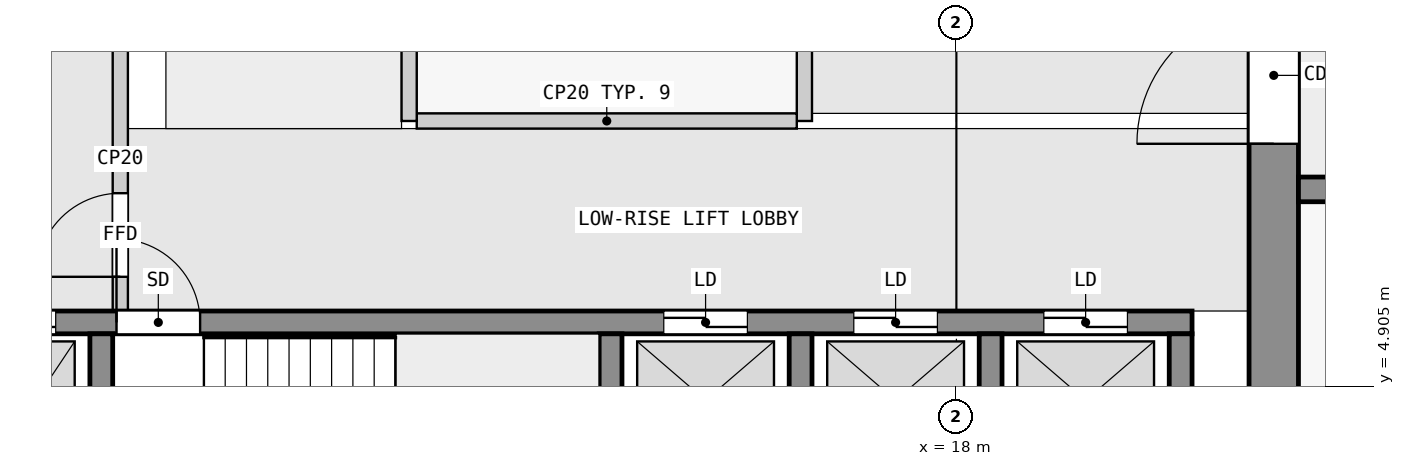
"""IFC4 building model, lengths in metres.
Left out: names, types, materials, properties, quantities, classifications, styles, units other than length and angle.
Written with IfcOpenShell. Run it as: python <this file> out.ifc"""

import sys

from ifc_helpers import new_model, si_unit, direction, frame, frame_2d, origin, place, context, subcontext, project, spatial, rectangle, extrude, element, fill, save


model = new_model("IFC4")
c1 = context("Model", 3, precision=1e-05, world=origin(), true_north=direction((0.0, 1.0)))
c2 = subcontext(c1, "Body", "Model", "MODEL_VIEW")
j1 = project(units=[si_unit("LENGTHUNIT", "METRE"), si_unit("PLANEANGLEUNIT", "RADIAN")], contexts=[c1])
p1 = place(None, origin())
s1 = spatial("IfcSite", under=j1, at=p1, CompositionType="ELEMENT")
p2 = place(p1, origin())
s2 = spatial("IfcBuilding", under=s1, at=p2, CompositionType="ELEMENT")
p3 = place(p2, frame((0.0, 0.0, 116.8)))
s3 = spatial("IfcBuildingStorey", under=s2, at=p3, CompositionType="ELEMENT", Elevation=116.8)
p4 = place(p3, frame((22.175, 2.5, 0.0), z_axis=(0.0, 0.0, 1.0), x_axis=(0.0, 1.0, 0.0)))
e1 = element("IfcWall", 1, at=p4, inside=s3, PredefinedType="SHEAR", context=c2, shape_type="SweptSolid", body=[
    extrude(rectangle(XDim=14.85, YDim=0.65, at=frame_2d((7.425, 0.0))), origin(), (0.0, 0.0, 1.0), 3.25),
])
p5 = place(p4, frame((5.6, 0.0, 0.0)))
e2 = element("IfcOpeningElement", 2, at=p5, cuts=e1, PredefinedType="OPENING", context=c2, shape_type="SweptSolid", body=[
    extrude(rectangle(XDim=1.8, YDim=2.1, at=frame_2d((0.9, 1.05))), frame((0.0, 0.335, 0.0), z_axis=(0.0, -1.0, 0.0), x_axis=(1.0, 0.0, 0.0)), (0.0, 0.0, 1.0), 0.67),
])
for number, where, z_axis, x_axis in (
    (3, (6.75, 2.8, 0.0), (0.0, 0.0, 1.0), (0.0, 1.0, 0.0)),
    (4, (13.45, 2.8, 0.0), (0.0, 0.0, 1.0), (0.0, 1.0, 0.0)),
    (5, (15.95, 2.8, 0.0), (0.0, 0.0, 1.0), (0.0, 1.0, 0.0)),
    (6, (18.45, 2.8, 0.0), (0.0, 0.0, 1.0), (0.0, 1.0, 0.0)),
    (7, (20.95, 2.8, 0.0), (0.0, 0.0, 1.0), (0.0, 1.0, 0.0)),
):
    element("IfcWall", number, at=place(p3, frame(where, z_axis=z_axis, x_axis=x_axis)), inside=s3, PredefinedType="SHEAR", context=c2, shape_type="SweptSolid", body=[
        extrude(rectangle(XDim=2.8, YDim=0.3, at=frame_2d((1.4, 0.0))), origin(), (0.0, 0.0, 1.0), 3.25),
    ])
p6 = place(p3, frame((2.3, 5.75, 0.0), z_axis=(0.0, 0.0, 1.0), x_axis=(1.0, 0.0, 0.0)))
e8 = element("IfcWall", 8, at=p6, inside=s3, PredefinedType="SHEAR", context=c2, shape_type="SweptSolid", body=[
    extrude(rectangle(XDim=18.8, YDim=0.3, at=frame_2d((9.4, 0.0))), origin(), (0.0, 0.0, 1.0), 3.25),
])
p7 = place(p6, frame((4.65, 0.0, 0.0)))
e9 = element("IfcOpeningElement", 9, at=p7, cuts=e8, PredefinedType="OPENING", context=c2, shape_type="SweptSolid", body=[
    extrude(rectangle(XDim=1.1, YDim=2.1, at=frame_2d((0.55, 1.05))), frame((0.0, 0.16, 0.0), z_axis=(0.0, -1.0, 0.0), x_axis=(1.0, 0.0, 0.0)), (0.0, 0.0, 1.0), 0.32),
])
p8 = place(p6, frame((0.45, 0.0, 0.0)))
e10 = element("IfcOpeningElement", 10, at=p8, cuts=e8, PredefinedType="OPENING", context=c2, shape_type="SweptSolid", body=[
    extrude(rectangle(XDim=1.1, YDim=2.1, at=frame_2d((0.55, 1.05))), frame((0.0, 0.16, 0.0), z_axis=(0.0, -1.0, 0.0), x_axis=(1.0, 0.0, 0.0)), (0.0, 0.0, 1.0), 0.32),
])
p9 = place(p6, frame((2.75, 0.0, 0.0)))
e11 = element("IfcOpeningElement", 11, at=p9, cuts=e8, PredefinedType="OPENING", context=c2, shape_type="SweptSolid", body=[
    extrude(rectangle(XDim=1.1, YDim=2.1, at=frame_2d((0.55, 1.05))), frame((0.0, 0.16, 0.0), z_axis=(0.0, -1.0, 0.0), x_axis=(1.0, 0.0, 0.0)), (0.0, 0.0, 1.0), 0.32),
])
p10 = place(p6, frame((11.85, 0.0, 0.0)))
e12 = element("IfcOpeningElement", 12, at=p10, cuts=e8, PredefinedType="OPENING", context=c2, shape_type="SweptSolid", body=[
    extrude(rectangle(XDim=1.1, YDim=2.1, at=frame_2d((0.55, 1.05))), frame((0.0, 0.16, 0.0), z_axis=(0.0, -1.0, 0.0), x_axis=(1.0, 0.0, 0.0)), (0.0, 0.0, 1.0), 0.32),
])
p11 = place(p6, frame((14.35, 0.0, 0.0)))
e13 = element("IfcOpeningElement", 13, at=p11, cuts=e8, PredefinedType="OPENING", context=c2, shape_type="SweptSolid", body=[
    extrude(rectangle(XDim=1.1, YDim=2.1, at=frame_2d((0.55, 1.05))), frame((0.0, 0.16, 0.0), z_axis=(0.0, -1.0, 0.0), x_axis=(1.0, 0.0, 0.0)), (0.0, 0.0, 1.0), 0.32),
])
p12 = place(p6, frame((16.85, 0.0, 0.0)))
e14 = element("IfcOpeningElement", 14, at=p12, cuts=e8, PredefinedType="OPENING", context=c2, shape_type="SweptSolid", body=[
    extrude(rectangle(XDim=1.1, YDim=2.1, at=frame_2d((0.55, 1.05))), frame((0.0, 0.16, 0.0), z_axis=(0.0, -1.0, 0.0), x_axis=(1.0, 0.0, 0.0)), (0.0, 0.0, 1.0), 0.32),
])
p13 = place(p3, frame((22.5, 7.5, 0.0), z_axis=(0.0, 0.0, 1.0), x_axis=(1.0, 0.0, 0.0)))
e15 = element("IfcWall", 15, at=p13, inside=s3, PredefinedType="SHEAR", context=c2, shape_type="SweptSolid", body=[
    extrude(rectangle(XDim=22.5, YDim=0.325, at=frame_2d((11.25, 0.0))), origin(), (0.0, 0.0, 1.0), 3.25),
])
p14 = place(p13, frame((1.75, 0.0, 0.0)))
e16 = element("IfcOpeningElement", 16, at=p14, cuts=e15, PredefinedType="OPENING", context=c2, shape_type="SweptSolid", body=[
    extrude(rectangle(XDim=1.0, YDim=2.1, at=frame_2d((0.5, 1.05))), frame((0.0, 0.172, 0.0), z_axis=(0.0, -1.0, 0.0), x_axis=(1.0, 0.0, 0.0)), (0.0, 0.0, 1.0), 0.345),
])
p15 = place(p13, frame((6.25, 0.0, 0.0)))
e17 = element("IfcOpeningElement", 17, at=p15, cuts=e15, PredefinedType="OPENING", context=c2, shape_type="SweptSolid", body=[
    extrude(rectangle(XDim=1.0, YDim=2.1, at=frame_2d((0.5, 1.05))), frame((0.0, 0.172, 0.0), z_axis=(0.0, -1.0, 0.0), x_axis=(1.0, 0.0, 0.0)), (0.0, 0.0, 1.0), 0.345),
])
p16 = place(p13, frame((10.75, 0.0, 0.0)))
e18 = element("IfcOpeningElement", 18, at=p16, cuts=e15, PredefinedType="OPENING", context=c2, shape_type="SweptSolid", body=[
    extrude(rectangle(XDim=1.0, YDim=2.1, at=frame_2d((0.5, 1.05))), frame((0.0, 0.172, 0.0), z_axis=(0.0, -1.0, 0.0), x_axis=(1.0, 0.0, 0.0)), (0.0, 0.0, 1.0), 0.345),
])
p17 = place(p13, frame((16.85, 0.0, 0.0)))
e19 = element("IfcOpeningElement", 19, at=p17, cuts=e15, PredefinedType="OPENING", context=c2, shape_type="SweptSolid", body=[
    extrude(rectangle(XDim=1.0, YDim=2.1, at=frame_2d((0.5, 1.05))), frame((0.0, 0.172, 0.0), z_axis=(0.0, -1.0, 0.0), x_axis=(1.0, 0.0, 0.0)), (0.0, 0.0, 1.0), 0.345),
])
p18 = place(p3, frame((7.0, 5.9, 0.0), z_axis=(0.0, 0.0, 1.0), x_axis=(0.0, 1.0, 0.0)))
e20 = element("IfcWall", 20, at=p18, inside=s3, PredefinedType="PARTITIONING", context=c2, shape_type="SweptSolid", body=[
    extrude(rectangle(XDim=4.0, YDim=0.2, at=frame_2d((2.0, 0.0))), origin(), (0.0, 0.0, 1.0), 3.25),
])
p19 = place(p18, frame((0.45, 0.0, 0.0)))
e21 = element("IfcOpeningElement", 21, at=p19, cuts=e20, PredefinedType="OPENING", context=c2, shape_type="SweptSolid", body=[
    extrude(rectangle(XDim=1.1, YDim=2.1, at=frame_2d((0.55, 1.05))), frame((0.0, 0.11, 0.0), z_axis=(0.0, -1.0, 0.0), x_axis=(1.0, 0.0, 0.0)), (0.0, 0.0, 1.0), 0.22),
])
p20 = place(p3, frame((10.8, 8.4, 0.0), z_axis=(0.0, 0.0, 1.0), x_axis=(0.0, 1.0, 0.0)))
e22 = element("IfcWall", 22, at=p20, inside=s3, PredefinedType="PARTITIONING", context=c2, shape_type="SweptSolid", body=[
    extrude(rectangle(XDim=6.2, YDim=0.2, at=frame_2d((3.1, 0.0))), origin(), (0.0, 0.0, 1.0), 3.25),
])
p21 = place(p3, frame((10.9, 8.4, 0.0), z_axis=(0.0, 0.0, 1.0), x_axis=(1.0, 0.0, 0.0)))
e23 = element("IfcWall", 23, at=p21, inside=s3, PredefinedType="PARTITIONING", context=c2, shape_type="SweptSolid", body=[
    extrude(rectangle(XDim=5.0, YDim=0.2, at=frame_2d((2.5, 0.0))), origin(), (0.0, 0.0, 1.0), 3.25),
])
p22 = place(p3, frame((16.0, 8.4, 0.0), z_axis=(0.0, 0.0, 1.0), x_axis=(0.0, 1.0, 0.0)))
e24 = element("IfcWall", 24, at=p22, inside=s3, PredefinedType="PARTITIONING", context=c2, shape_type="SweptSolid", body=[
    extrude(rectangle(XDim=6.2, YDim=0.2, at=frame_2d((3.1, 0.0))), origin(), (0.0, 0.0, 1.0), 3.25),
])
p23 = place(p22, frame((3.15, 0.0, 0.0)))
e25 = element("IfcOpeningElement", 25, at=p23, cuts=e24, PredefinedType="OPENING", context=c2, shape_type="SweptSolid", body=[
    extrude(rectangle(XDim=0.9, YDim=2.1, at=frame_2d((0.45, 1.05))), frame((0.0, 0.11, 0.0), z_axis=(0.0, -1.0, 0.0), x_axis=(1.0, 0.0, 0.0)), (0.0, 0.0, 1.0), 0.22),
])
p24 = place(p19, origin())
e26 = element("IfcDoor", 26, at=p24, inside=s3, OperationType="SINGLE_SWING_LEFT", PredefinedType="DOOR", context=c2, shape_type="SweptSolid", body=[
    extrude(rectangle(XDim=1.1, YDim=2.1, at=frame_2d((0.55, 1.05))), frame((0.0, 0.025, 0.0), z_axis=(0.0, -1.0, 0.0), x_axis=(1.0, 0.0, 0.0)), (0.0, 0.0, 1.0), 0.05),
])
fill(e21, e26)
p25 = place(p7, origin())
e27 = element("IfcDoor", 27, at=p25, inside=s3, OperationType="SINGLE_SWING_LEFT", PredefinedType="DOOR", context=c2, shape_type="SweptSolid", body=[
    extrude(rectangle(XDim=1.1, YDim=2.1, at=frame_2d((0.55, 1.05))), frame((0.0, 0.025, 0.0), z_axis=(0.0, -1.0, 0.0), x_axis=(1.0, 0.0, 0.0)), (0.0, 0.0, 1.0), 0.05),
])
fill(e9, e27)
p26 = place(p9, origin())
e28 = element("IfcDoor", 28, at=p26, inside=s3, OperationType="DOUBLE_DOOR_SLIDING", PredefinedType="DOOR", context=c2, shape_type="SweptSolid", body=[
    extrude(rectangle(XDim=1.1, YDim=2.1, at=frame_2d((0.55, 1.05))), frame((0.0, 0.025, 0.0), z_axis=(0.0, -1.0, 0.0), x_axis=(1.0, 0.0, 0.0)), (0.0, 0.0, 1.0), 0.05),
])
fill(e11, e28)
p27 = place(p10, origin())
e29 = element("IfcDoor", 29, at=p27, inside=s3, OperationType="DOUBLE_DOOR_SLIDING", PredefinedType="DOOR", context=c2, shape_type="SweptSolid", body=[
    extrude(rectangle(XDim=1.1, YDim=2.1, at=frame_2d((0.55, 1.05))), frame((0.0, 0.025, 0.0), z_axis=(0.0, -1.0, 0.0), x_axis=(1.0, 0.0, 0.0)), (0.0, 0.0, 1.0), 0.05),
])
fill(e12, e29)
p28 = place(p11, origin())
e30 = element("IfcDoor", 30, at=p28, inside=s3, OperationType="DOUBLE_DOOR_SLIDING", PredefinedType="DOOR", context=c2, shape_type="SweptSolid", body=[
    extrude(rectangle(XDim=1.1, YDim=2.1, at=frame_2d((0.55, 1.05))), frame((0.0, 0.025, 0.0), z_axis=(0.0, -1.0, 0.0), x_axis=(1.0, 0.0, 0.0)), (0.0, 0.0, 1.0), 0.05),
])
fill(e13, e30)
p29 = place(p12, origin())
e31 = element("IfcDoor", 31, at=p29, inside=s3, OperationType="DOUBLE_DOOR_SLIDING", PredefinedType="DOOR", context=c2, shape_type="SweptSolid", body=[
    extrude(rectangle(XDim=1.1, YDim=2.1, at=frame_2d((0.55, 1.05))), frame((0.0, 0.025, 0.0), z_axis=(0.0, -1.0, 0.0), x_axis=(1.0, 0.0, 0.0)), (0.0, 0.0, 1.0), 0.05),
])
fill(e14, e31)
p30 = place(p5, origin())
e32 = element("IfcDoor", 32, at=p30, inside=s3, OperationType="DOUBLE_DOOR_SINGLE_SWING", PredefinedType="DOOR", context=c2, shape_type="SweptSolid", body=[
    extrude(rectangle(XDim=1.8, YDim=2.1, at=frame_2d((0.9, 1.05))), frame((0.0, 0.025, 0.0), z_axis=(0.0, -1.0, 0.0), x_axis=(1.0, 0.0, 0.0)), (0.0, 0.0, 1.0), 0.05),
])
fill(e2, e32)
save(model, sys.argv[1])
